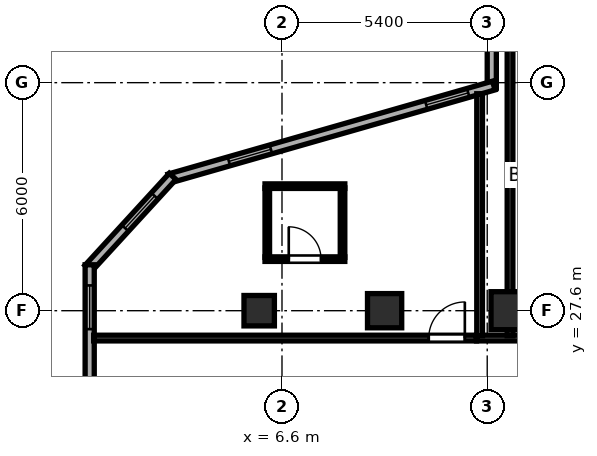
"""IFC4 building model, lengths in metres.
Left out: names, types, materials, properties, quantities, classifications, styles, units other than length and angle.
Written with IfcOpenShell. Run it as: python <this file> out.ifc"""

import sys

from ifc_helpers import new_model, si_unit, direction, frame, frame_2d, origin, origin_2d, place, context, subcontext, project, spatial, rectangle, hollow_rectangle, extrude, element, fill, save


model = new_model("IFC4")
c1 = context("Model", 3, precision=1e-05, world=origin(), true_north=direction((0.0, 1.0)))
c2 = subcontext(c1, "Body", "Model", "MODEL_VIEW")
j1 = project(units=[si_unit("LENGTHUNIT", "METRE"), si_unit("PLANEANGLEUNIT", "RADIAN")], contexts=[c1])
p1 = place(None, origin())
s1 = spatial("IfcSite", under=j1, at=p1, CompositionType="ELEMENT")
p2 = place(p1, origin())
s2 = spatial("IfcBuilding", under=s1, at=p2, CompositionType="ELEMENT")
p3 = place(p2, frame((0.0, 0.0, 128.8)))
s3 = spatial("IfcBuildingStorey", under=s2, at=p3, CompositionType="ELEMENT", Elevation=128.8)
p4 = place(p3, frame((12.6, 27.6, 0.0), z_axis=(0.0, 0.0, 1.0), x_axis=(1.0, 0.0, 0.0)))
e1 = element("IfcColumn", 1, at=p4, inside=s3, PredefinedType="COLUMN", context=c2, shape_type="SweptSolid", body=[
    extrude(hollow_rectangle(XDim=1.0, YDim=1.0, WallThickness=0.038, at=origin_2d()), origin(), (0.0, 0.0, 1.0), 3.8),
])
p5 = place(p3, frame((6.0, 27.6, 0.0), z_axis=(0.0, 0.0, 1.0), x_axis=(1.0, 0.0, 0.0)))
e2 = element("IfcColumn", 2, at=p5, inside=s3, PredefinedType="COLUMN", context=c2, shape_type="SweptSolid", body=[
    extrude(hollow_rectangle(XDim=0.8, YDim=0.8, WallThickness=0.03, at=origin_2d()), origin(), (0.0, 0.0, 1.0), 3.8),
])
p6 = place(p3, frame((9.3, 27.6, 0.0), z_axis=(0.0, 0.0, 1.0), x_axis=(1.0, 0.0, 0.0)))
e3 = element("IfcColumn", 3, at=p6, inside=s3, PredefinedType="COLUMN", context=c2, shape_type="SweptSolid", body=[
    extrude(hollow_rectangle(XDim=0.9, YDim=0.9, WallThickness=0.034, at=origin_2d()), origin(), (0.0, 0.0, 1.0), 3.8),
])
p7 = place(p3, frame((12.12, 37.535, 0.0), z_axis=(0.0, 0.0, 1.0), x_axis=(0.0, -1.0, 0.0)))
e4 = element("IfcWall", 4, at=p7, inside=s3, PredefinedType="SOLIDWALL", context=c2, shape_type="SweptSolid", body=[
    extrude(rectangle(XDim=4.08, YDim=0.24, at=frame_2d((2.04, 0.0))), origin(), (0.0, 0.0, 1.0), 3.6),
])
p8 = place(p7, frame((0.7, 0.0, 0.85)))
e5 = element("IfcOpeningElement", 5, at=p8, cuts=e4, PredefinedType="OPENING", context=c2, shape_type="SweptSolid", body=[
    extrude(rectangle(XDim=1.15, YDim=1.8, at=frame_2d((0.575, 0.9))), frame((0.0, 0.13, 0.0), z_axis=(0.0, -1.0, 0.0), x_axis=(1.0, 0.0, 0.0)), (0.0, 0.0, 1.0), 0.26),
])
p9 = place(p3, frame((12.173, 33.525, 0.0), z_axis=(0.0, 0.0, 1.0), x_axis=(-0.961351601853, -0.275323623424, 0.0)))
e6 = element("IfcWall", 6, at=p9, inside=s3, PredefinedType="SOLIDWALL", context=c2, shape_type="SweptSolid", body=[
    extrude(rectangle(XDim=8.883, YDim=0.24, at=frame_2d((4.442, 0.0))), origin(), (0.0, 0.0, 1.0), 3.6),
])
p10 = place(p9, frame((0.7, 0.0, 0.85)))
e7 = element("IfcOpeningElement", 7, at=p10, cuts=e6, PredefinedType="OPENING", context=c2, shape_type="SweptSolid", body=[
    extrude(rectangle(XDim=1.15, YDim=1.8, at=frame_2d((0.575, 0.9))), frame((0.0, 0.13, 0.0), z_axis=(0.0, -1.0, 0.0), x_axis=(1.0, 0.0, 0.0)), (0.0, 0.0, 1.0), 0.26),
])
p11 = place(p9, frame((6.1, 0.0, 0.85)))
e8 = element("IfcOpeningElement", 8, at=p11, cuts=e6, PredefinedType="OPENING", context=c2, shape_type="SweptSolid", body=[
    extrude(rectangle(XDim=1.15, YDim=1.8, at=frame_2d((0.575, 0.9))), frame((0.0, 0.13, 0.0), z_axis=(0.0, -1.0, 0.0), x_axis=(1.0, 0.0, 0.0)), (0.0, 0.0, 1.0), 0.26),
])
p12 = place(p3, frame((3.723, 31.135, 0.0), z_axis=(0.0, 0.0, 1.0), x_axis=(-0.675788561887, -0.737095529509, 0.0)))
e9 = element("IfcWall", 9, at=p12, inside=s3, PredefinedType="SOLIDWALL", context=c2, shape_type="SweptSolid", body=[
    extrude(rectangle(XDim=3.285, YDim=0.24, at=frame_2d((1.643, 0.0))), origin(), (0.0, 0.0, 1.0), 3.6),
])
p13 = place(p12, frame((0.7, 0.0, 0.85)))
e10 = element("IfcOpeningElement", 10, at=p13, cuts=e9, PredefinedType="OPENING", context=c2, shape_type="SweptSolid", body=[
    extrude(rectangle(XDim=1.15, YDim=1.8, at=frame_2d((0.575, 0.9))), frame((0.0, 0.13, 0.0), z_axis=(0.0, -1.0, 0.0), x_axis=(1.0, 0.0, 0.0)), (0.0, 0.0, 1.0), 0.26),
])
p14 = place(p3, frame((1.54, 28.808, 0.0), z_axis=(0.0, 0.0, 1.0), x_axis=(0.0, -1.0, 0.0)))
e11 = element("IfcWall", 11, at=p14, inside=s3, PredefinedType="SOLIDWALL", context=c2, shape_type="SweptSolid", body=[
    extrude(rectangle(XDim=20.844, YDim=0.24, at=frame_2d((10.422, 0.0))), origin(), (0.0, 0.0, 1.0), 3.6),
])
p15 = place(p14, frame((0.543, 0.0, 0.85)))
e12 = element("IfcOpeningElement", 12, at=p15, cuts=e11, PredefinedType="OPENING", context=c2, shape_type="SweptSolid", body=[
    extrude(rectangle(XDim=1.15, YDim=1.8, at=frame_2d((0.575, 0.9))), frame((0.0, 0.13, 0.0), z_axis=(0.0, -1.0, 0.0), x_axis=(1.0, 0.0, 0.0)), (0.0, 0.0, 1.0), 0.26),
])
p16 = place(p14, frame((6.1, 0.0, 0.85)))
e13 = element("IfcOpeningElement", 13, at=p16, cuts=e11, PredefinedType="OPENING", context=c2, shape_type="SweptSolid", body=[
    extrude(rectangle(XDim=1.15, YDim=1.8, at=frame_2d((0.575, 0.9))), frame((0.0, 0.13, 0.0), z_axis=(0.0, -1.0, 0.0), x_axis=(1.0, 0.0, 0.0)), (0.0, 0.0, 1.0), 0.26),
])
p17 = place(p14, frame((11.5, 0.0, 0.85)))
e14 = element("IfcOpeningElement", 14, at=p17, cuts=e11, PredefinedType="OPENING", context=c2, shape_type="SweptSolid", body=[
    extrude(rectangle(XDim=1.15, YDim=1.8, at=frame_2d((0.575, 0.9))), frame((0.0, 0.13, 0.0), z_axis=(0.0, -1.0, 0.0), x_axis=(1.0, 0.0, 0.0)), (0.0, 0.0, 1.0), 0.26),
])
p18 = place(p14, frame((16.9, 0.0, 0.85)))
e15 = element("IfcOpeningElement", 15, at=p18, cuts=e11, PredefinedType="OPENING", context=c2, shape_type="SweptSolid", body=[
    extrude(rectangle(XDim=1.15, YDim=1.8, at=frame_2d((0.575, 0.9))), frame((0.0, 0.13, 0.0), z_axis=(0.0, -1.0, 0.0), x_axis=(1.0, 0.0, 0.0)), (0.0, 0.0, 1.0), 0.26),
])
p19 = place(p3, frame((11.72, 26.88, 0.0), z_axis=(0.0, 0.0, 1.0), x_axis=(1.0, 0.0, 0.0)))
e16 = element("IfcWall", 16, at=p19, inside=s3, PredefinedType="PARTITIONING", context=c2, shape_type="SweptSolid", body=[
    extrude(rectangle(XDim=6.88, YDim=0.15, at=frame_2d((3.44, 0.0))), origin(), (0.0, 0.0, 1.0), 3.6),
])
p20 = place(p3, frame((11.8, 26.94, 0.0), z_axis=(0.0, 0.0, 1.0), x_axis=(0.0, 1.0, 0.0)))
e17 = element("IfcWall", 17, at=p20, inside=s3, PredefinedType="PARTITIONING", context=c2, shape_type="SweptSolid", body=[
    extrude(rectangle(XDim=6.369, YDim=0.15, at=frame_2d((3.184, 0.0))), origin(), (0.0, 0.0, 1.0), 3.6),
])
p21 = place(p3, frame((1.645, 26.88, 0.0), z_axis=(0.0, 0.0, 1.0), x_axis=(1.0, 0.0, 0.0)))
e18 = element("IfcWall", 18, at=p21, inside=s3, PredefinedType="PARTITIONING", context=c2, shape_type="SweptSolid", body=[
    extrude(rectangle(XDim=10.073, YDim=0.15, at=frame_2d((5.037, 0.0))), origin(), (0.0, 0.0, 1.0), 3.6),
])
p22 = place(p21, frame((8.816, 0.0, 0.0)))
e19 = element("IfcOpeningElement", 19, at=p22, cuts=e18, PredefinedType="OPENING", context=c2, shape_type="SweptSolid", body=[
    extrude(rectangle(XDim=0.95, YDim=2.15, at=frame_2d((0.475, 1.075))), frame((0.0, 0.085, 0.0), z_axis=(0.0, -1.0, 0.0), x_axis=(1.0, 0.0, 0.0)), (0.0, 0.0, 1.0), 0.17),
])
p23 = place(p3, frame((12.6, 26.94, 0.0), z_axis=(0.0, 0.0, 1.0), x_axis=(0.0, 1.0, 0.0)))
e20 = element("IfcWall", 20, at=p23, inside=s3, PredefinedType="PARTITIONING", context=c2, shape_type="SweptSolid", body=[
    extrude(rectangle(XDim=7.6, YDim=0.15, at=frame_2d((3.8, 0.0))), origin(), (0.0, 0.0, 1.0), 3.145),
])
p24 = place(p3, frame((6.153, 30.877, 0.0), z_axis=(0.0, 0.0, 1.0), x_axis=(1.0, 0.0, 0.0)))
e21 = element("IfcWall", 21, at=p24, inside=s3, PredefinedType="PARTITIONING", context=c2, shape_type="SweptSolid", body=[
    extrude(rectangle(XDim=2.1, YDim=0.12, at=frame_2d((1.05, 0.0))), origin(), (0.0, 0.0, 1.0), 3.6),
])
p25 = place(p3, frame((6.153, 28.957, 0.0), z_axis=(0.0, 0.0, 1.0), x_axis=(1.0, 0.0, 0.0)))
e22 = element("IfcWall", 22, at=p25, inside=s3, PredefinedType="PARTITIONING", context=c2, shape_type="SweptSolid", body=[
    extrude(rectangle(XDim=2.1, YDim=0.12, at=frame_2d((1.05, 0.0))), origin(), (0.0, 0.0, 1.0), 3.6),
])
p26 = place(p25, frame((0.625, 0.0, 0.0)))
e23 = element("IfcOpeningElement", 23, at=p26, cuts=e22, PredefinedType="OPENING", context=c2, shape_type="SweptSolid", body=[
    extrude(rectangle(XDim=0.85, YDim=2.1, at=frame_2d((0.425, 1.05))), frame((0.0, 0.07, 0.0), z_axis=(0.0, -1.0, 0.0), x_axis=(1.0, 0.0, 0.0)), (0.0, 0.0, 1.0), 0.14),
])
for number, where, z_axis, x_axis in (
    (24, (6.213, 29.002, 0.0), (0.0, 0.0, 1.0), (0.0, 1.0, 0.0)),
    (25, (8.193, 29.002, 0.0), (0.0, 0.0, 1.0), (0.0, 1.0, 0.0)),
):
    element("IfcWall", number, at=place(p3, frame(where, z_axis=z_axis, x_axis=x_axis)), inside=s3, PredefinedType="PARTITIONING", context=c2, shape_type="SweptSolid", body=[
        extrude(rectangle(XDim=1.83, YDim=0.12, at=frame_2d((0.915, 0.0))), origin(), (0.0, 0.0, 1.0), 3.6),
    ])
p27 = place(p10, origin())
e26 = element("IfcWindow", 26, at=p27, inside=s3, PartitioningType="SINGLE_PANEL", PredefinedType="WINDOW", context=c2, shape_type="SweptSolid", body=[
    extrude(rectangle(XDim=1.15, YDim=1.8, at=frame_2d((0.575, 0.9))), frame((0.0, 0.03, 0.0), z_axis=(0.0, -1.0, 0.0), x_axis=(1.0, 0.0, 0.0)), (0.0, 0.0, 1.0), 0.06),
])
fill(e7, e26)
p28 = place(p11, origin())
e27 = element("IfcWindow", 27, at=p28, inside=s3, PartitioningType="SINGLE_PANEL", PredefinedType="WINDOW", context=c2, shape_type="SweptSolid", body=[
    extrude(rectangle(XDim=1.15, YDim=1.8, at=frame_2d((0.575, 0.9))), frame((0.0, 0.03, 0.0), z_axis=(0.0, -1.0, 0.0), x_axis=(1.0, 0.0, 0.0)), (0.0, 0.0, 1.0), 0.06),
])
fill(e8, e27)
p29 = place(p13, origin())
e28 = element("IfcWindow", 28, at=p29, inside=s3, PartitioningType="SINGLE_PANEL", PredefinedType="WINDOW", context=c2, shape_type="SweptSolid", body=[
    extrude(rectangle(XDim=1.15, YDim=1.8, at=frame_2d((0.575, 0.9))), frame((0.0, 0.03, 0.0), z_axis=(0.0, -1.0, 0.0), x_axis=(1.0, 0.0, 0.0)), (0.0, 0.0, 1.0), 0.06),
])
fill(e10, e28)
p30 = place(p15, origin())
e29 = element("IfcWindow", 29, at=p30, inside=s3, PartitioningType="SINGLE_PANEL", PredefinedType="WINDOW", context=c2, shape_type="SweptSolid", body=[
    extrude(rectangle(XDim=1.15, YDim=1.8, at=frame_2d((0.575, 0.9))), frame((0.0, 0.03, 0.0), z_axis=(0.0, -1.0, 0.0), x_axis=(1.0, 0.0, 0.0)), (0.0, 0.0, 1.0), 0.06),
])
fill(e12, e29)
p31 = place(p22, origin())
e30 = element("IfcDoor", 30, at=p31, inside=s3, OperationType="SINGLE_SWING_RIGHT", PredefinedType="DOOR", context=c2, shape_type="SweptSolid", body=[
    extrude(rectangle(XDim=0.95, YDim=2.15, at=frame_2d((0.475, 1.075))), frame((0.0, 0.025, 0.0), z_axis=(0.0, -1.0, 0.0), x_axis=(1.0, 0.0, 0.0)), (0.0, 0.0, 1.0), 0.05),
])
fill(e19, e30)
p32 = place(p26, origin())
e31 = element("IfcDoor", 31, at=p32, inside=s3, OperationType="SINGLE_SWING_LEFT", PredefinedType="DOOR", context=c2, shape_type="SweptSolid", body=[
    extrude(rectangle(XDim=0.85, YDim=2.1, at=frame_2d((0.425, 1.05))), frame((0.0, 0.025, 0.0), z_axis=(0.0, -1.0, 0.0), x_axis=(1.0, 0.0, 0.0)), (0.0, 0.0, 1.0), 0.05),
])
fill(e23, e31)
save(model, sys.argv[1])
